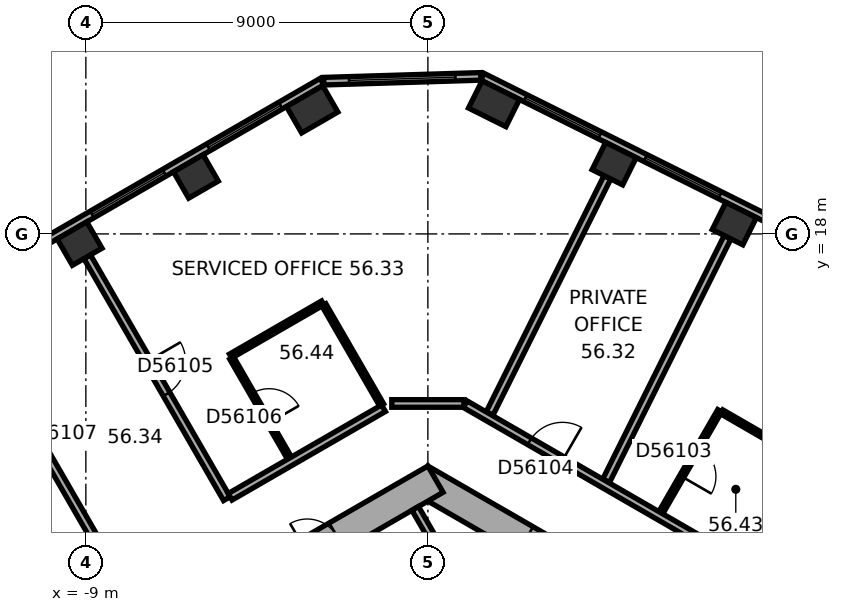
"""IFC4 building model, lengths in metres.
Left out: names, types, materials, properties, quantities, classifications, styles, units other than length and angle.
Written with IfcOpenShell. Run it as: python <this file> out.ifc"""

import sys

from ifc_helpers import new_model, si_unit, direction, frame, frame_2d, origin, origin_2d, place, context, subcontext, project, spatial, rectangle, extrude, element, fill, save


model = new_model("IFC4")
c1 = context("Model", 3, precision=1e-05, world=origin(), true_north=direction((0.0, 1.0)))
c2 = subcontext(c1, "Body", "Model", "MODEL_VIEW")
j1 = project(units=[si_unit("LENGTHUNIT", "METRE"), si_unit("PLANEANGLEUNIT", "RADIAN")], contexts=[c1])
p1 = place(None, origin())
s1 = spatial("IfcSite", under=j1, at=p1, CompositionType="ELEMENT")
p2 = place(p1, origin())
s2 = spatial("IfcBuilding", under=s1, at=p2, CompositionType="ELEMENT")
p3 = place(p2, frame((0.0, 0.0, 229.1)))
s3 = spatial("IfcBuildingStorey", under=s2, at=p3, CompositionType="ELEMENT", Elevation=229.1)
for number, where, z_axis, x_axis in (
    (1, (8.064, 18.271, 0.0), (0.0, 0.0, 1.0), (-0.895, 0.446, 0.0)),
    (2, (4.902, 19.848, 0.0), (0.0, 0.0, 1.0), (-0.895, 0.446, 0.0)),
):
    element("IfcColumn", number, at=place(p3, frame(where, z_axis=z_axis, x_axis=x_axis)), inside=s3, PredefinedType="COLUMN", context=c2, shape_type="SweptSolid", body=[
        extrude(rectangle(XDim=0.9, YDim=0.8, at=origin_2d()), origin(), (0.0, 0.0, 1.0), 3.7),
    ])
for number, where, z_axis, x_axis in (
    (3, (1.74, 21.425, 0.0), (0.0, 0.0, 1.0), (-0.895, 0.446, 0.0)),
    (4, (-3.044, 21.279, 0.0), (0.0, 0.0, 1.0), (-0.866, -0.5, 0.0)),
):
    element("IfcColumn", number, at=place(p3, frame(where, z_axis=z_axis, x_axis=x_axis)), inside=s3, PredefinedType="COLUMN", context=c2, shape_type="SweptSolid", body=[
        extrude(rectangle(XDim=1.1, YDim=0.8, at=origin_2d()), origin(), (0.0, 0.0, 1.0), 3.7),
    ])
for number, where, z_axis, x_axis in (
    (5, (-6.104, 19.512, 0.0), (0.0, 0.0, 1.0), (-0.866, -0.5, 0.0)),
    (6, (-9.165, 17.745, 0.0), (0.0, 0.0, 1.0), (-0.866, -0.5, 0.0)),
):
    element("IfcColumn", number, at=place(p3, frame(where, z_axis=z_axis, x_axis=x_axis)), inside=s3, PredefinedType="COLUMN", context=c2, shape_type="SweptSolid", body=[
        extrude(rectangle(XDim=0.9, YDim=0.8, at=origin_2d()), origin(), (0.0, 0.0, 1.0), 3.7),
    ])
p4 = place(p3, frame((10.1, 5.6, 0.0), z_axis=(0.0, 0.0, 1.0), x_axis=(-0.866023897231, 0.500002609418, 0.0)))
e7 = element("IfcWall", 7, at=p4, inside=s3, PredefinedType="SHEAR", context=c2, shape_type="SweptSolid", body=[
    extrude(rectangle(XDim=11.894, YDim=0.8, at=frame_2d((5.947, 0.0))), origin(), (0.0, 0.0, 1.0), 3.7),
])
p5 = place(p4, frame((3.897, 0.0, 0.0)))
e8 = element("IfcOpeningElement", 8, at=p5, cuts=e7, PredefinedType="OPENING", context=c2, shape_type="SweptSolid", body=[
    extrude(rectangle(XDim=0.9, YDim=2.1, at=frame_2d((0.45, 1.05))), frame((0.0, 0.41, 0.0), z_axis=(0.0, -1.0, 0.0), x_axis=(1.0, 0.0, 0.0)), (0.0, 0.0, 1.0), 0.82),
])
p6 = place(p4, frame((7.797, 0.0, 0.0)))
e9 = element("IfcOpeningElement", 9, at=p6, cuts=e7, PredefinedType="OPENING", context=c2, shape_type="SweptSolid", body=[
    extrude(rectangle(XDim=0.9, YDim=2.1, at=frame_2d((0.45, 1.05))), frame((0.0, 0.41, 0.0), z_axis=(0.0, -1.0, 0.0), x_axis=(1.0, 0.0, 0.0)), (0.0, 0.0, 1.0), 0.82),
])
p7 = place(p3, frame((0.2, 11.547, 0.0), z_axis=(0.0, 0.0, 1.0), x_axis=(-0.866023897231, -0.500002609418, 0.0)))
e10 = element("IfcWall", 10, at=p7, inside=s3, PredefinedType="SHEAR", context=c2, shape_type="SweptSolid", body=[
    extrude(rectangle(XDim=11.894, YDim=0.8, at=frame_2d((5.947, 0.0))), origin(), (0.0, 0.0, 1.0), 3.7),
])
p8 = place(p7, frame((6.147, 0.0, 0.0)))
e11 = element("IfcOpeningElement", 11, at=p8, cuts=e10, PredefinedType="OPENING", context=c2, shape_type="SweptSolid", body=[
    extrude(rectangle(XDim=1.5, YDim=2.1, at=frame_2d((0.75, 1.05))), frame((0.0, 0.41, 0.0), z_axis=(0.0, -1.0, 0.0), x_axis=(1.0, 0.0, 0.0)), (0.0, 0.0, 1.0), 0.82),
])
p9 = place(p7, frame((2.997, 0.0, 0.0)))
e12 = element("IfcOpeningElement", 12, at=p9, cuts=e10, PredefinedType="OPENING", context=c2, shape_type="SweptSolid", body=[
    extrude(rectangle(XDim=0.9, YDim=2.1, at=frame_2d((0.45, 1.05))), frame((0.0, 0.41, 0.0), z_axis=(0.0, -1.0, 0.0), x_axis=(1.0, 0.0, 0.0)), (0.0, 0.0, 1.0), 0.82),
])
p10 = place(p3, frame((18.299, 13.727, 0.0), z_axis=(0.0, 0.0, 1.0), x_axis=(-0.894934554817, 0.44619742558, 0.0)))
e13 = element("IfcWall", 13, at=p10, inside=s3, PredefinedType="STANDARD", context=c2, shape_type="SweptSolid", body=[
    extrude(rectangle(XDim=18.841, YDim=0.2, at=frame_2d((9.421, 0.0))), origin(), (0.0, 0.0, 1.0), 3.7),
])
p11 = place(p10, frame((1.253, 0.0, 0.9)))
e14 = element("IfcOpeningElement", 14, at=p11, cuts=e13, PredefinedType="OPENING", context=c2, shape_type="SweptSolid", body=[
    extrude(rectangle(XDim=2.2, YDim=2.0, at=frame_2d((1.1, 1.0))), frame((0.0, 0.11, 0.0), z_axis=(0.0, -1.0, 0.0), x_axis=(1.0, 0.0, 0.0)), (0.0, 0.0, 1.0), 0.22),
])
p12 = place(p10, frame((4.786, 0.0, 0.9)))
e15 = element("IfcOpeningElement", 15, at=p12, cuts=e13, PredefinedType="OPENING", context=c2, shape_type="SweptSolid", body=[
    extrude(rectangle(XDim=2.2, YDim=2.0, at=frame_2d((1.1, 1.0))), frame((0.0, 0.11, 0.0), z_axis=(0.0, -1.0, 0.0), x_axis=(1.0, 0.0, 0.0)), (0.0, 0.0, 1.0), 0.22),
])
p13 = place(p10, frame((8.32, 0.0, 0.9)))
e16 = element("IfcOpeningElement", 16, at=p13, cuts=e13, PredefinedType="OPENING", context=c2, shape_type="SweptSolid", body=[
    extrude(rectangle(XDim=2.2, YDim=2.0, at=frame_2d((1.1, 1.0))), frame((0.0, 0.11, 0.0), z_axis=(0.0, -1.0, 0.0), x_axis=(1.0, 0.0, 0.0)), (0.0, 0.0, 1.0), 0.22),
])
p14 = place(p10, frame((11.854, 0.0, 0.9)))
e17 = element("IfcOpeningElement", 17, at=p14, cuts=e13, PredefinedType="OPENING", context=c2, shape_type="SweptSolid", body=[
    extrude(rectangle(XDim=2.2, YDim=2.0, at=frame_2d((1.1, 1.0))), frame((0.0, 0.11, 0.0), z_axis=(0.0, -1.0, 0.0), x_axis=(1.0, 0.0, 0.0)), (0.0, 0.0, 1.0), 0.22),
])
p15 = place(p10, frame((15.387, 0.0, 0.9)))
e18 = element("IfcOpeningElement", 18, at=p15, cuts=e13, PredefinedType="OPENING", context=c2, shape_type="SweptSolid", body=[
    extrude(rectangle(XDim=2.2, YDim=2.0, at=frame_2d((1.1, 1.0))), frame((0.0, 0.11, 0.0), z_axis=(0.0, -1.0, 0.0), x_axis=(1.0, 0.0, 0.0)), (0.0, 0.0, 1.0), 0.22),
])
p16 = place(p3, frame((1.389, 22.145, 0.0), z_axis=(0.0, 0.0, 1.0), x_axis=(-0.999534702881, -0.030502093955, 0.0)))
e19 = element("IfcWall", 19, at=p16, inside=s3, PredefinedType="STANDARD", context=c2, shape_type="SweptSolid", body=[
    extrude(rectangle(XDim=4.13, YDim=0.2, at=frame_2d((2.065, 0.0))), origin(), (0.0, 0.0, 1.0), 3.7),
])
p17 = place(p16, frame((0.665, 0.0, 0.9)))
e20 = element("IfcOpeningElement", 20, at=p17, cuts=e19, PredefinedType="OPENING", context=c2, shape_type="SweptSolid", body=[
    extrude(rectangle(XDim=2.8, YDim=2.0, at=frame_2d((1.4, 1.0))), frame((0.0, 0.11, 0.0), z_axis=(0.0, -1.0, 0.0), x_axis=(1.0, 0.0, 0.0)), (0.0, 0.0, 1.0), 0.22),
])
p18 = place(p3, frame((-2.786, 22.005, 0.0), z_axis=(0.0, 0.0, 1.0), x_axis=(-0.866026555358, -0.49999800541, 0.0)))
e21 = element("IfcWall", 21, at=p18, inside=s3, PredefinedType="STANDARD", context=c2, shape_type="SweptSolid", body=[
    extrude(rectangle(XDim=18.841, YDim=0.2, at=frame_2d((9.421, 0.0))), origin(), (0.0, 0.0, 1.0), 3.7),
])
p19 = place(p18, frame((1.254, 0.0, 0.9)))
e22 = element("IfcOpeningElement", 22, at=p19, cuts=e21, PredefinedType="OPENING", context=c2, shape_type="SweptSolid", body=[
    extrude(rectangle(XDim=2.2, YDim=2.0, at=frame_2d((1.1, 1.0))), frame((0.0, 0.11, 0.0), z_axis=(0.0, -1.0, 0.0), x_axis=(1.0, 0.0, 0.0)), (0.0, 0.0, 1.0), 0.22),
])
p20 = place(p18, frame((4.788, 0.0, 0.9)))
e23 = element("IfcOpeningElement", 23, at=p20, cuts=e21, PredefinedType="OPENING", context=c2, shape_type="SweptSolid", body=[
    extrude(rectangle(XDim=2.2, YDim=2.0, at=frame_2d((1.1, 1.0))), frame((0.0, 0.11, 0.0), z_axis=(0.0, -1.0, 0.0), x_axis=(1.0, 0.0, 0.0)), (0.0, 0.0, 1.0), 0.22),
])
p21 = place(p18, frame((8.321, 0.0, 0.9)))
e24 = element("IfcOpeningElement", 24, at=p21, cuts=e21, PredefinedType="OPENING", context=c2, shape_type="SweptSolid", body=[
    extrude(rectangle(XDim=2.2, YDim=2.0, at=frame_2d((1.1, 1.0))), frame((0.0, 0.11, 0.0), z_axis=(0.0, -1.0, 0.0), x_axis=(1.0, 0.0, 0.0)), (0.0, 0.0, 1.0), 0.22),
])
p22 = place(p18, frame((11.855, 0.0, 0.9)))
e25 = element("IfcOpeningElement", 25, at=p22, cuts=e21, PredefinedType="OPENING", context=c2, shape_type="SweptSolid", body=[
    extrude(rectangle(XDim=2.2, YDim=2.0, at=frame_2d((1.1, 1.0))), frame((0.0, 0.11, 0.0), z_axis=(0.0, -1.0, 0.0), x_axis=(1.0, 0.0, 0.0)), (0.0, 0.0, 1.0), 0.22),
])
p23 = place(p18, frame((15.389, 0.0, 0.9)))
e26 = element("IfcOpeningElement", 26, at=p23, cuts=e21, PredefinedType="OPENING", context=c2, shape_type="SweptSolid", body=[
    extrude(rectangle(XDim=2.2, YDim=2.0, at=frame_2d((1.1, 1.0))), frame((0.0, 0.11, 0.0), z_axis=(0.0, -1.0, 0.0), x_axis=(1.0, 0.0, 0.0)), (0.0, 0.0, 1.0), 0.22),
])
p24 = place(p3, frame((0.767, 8.872, 0.0), z_axis=(0.0, 0.0, 1.0), x_axis=(-0.499994660107, 0.866028486751, 0.0)))
e27 = element("IfcWall", 27, at=p24, inside=s3, PredefinedType="PARTITIONING", context=c2, shape_type="SweptSolid", body=[
    extrude(rectangle(XDim=2.2, YDim=0.2, at=frame_2d((1.1, 0.0))), origin(), (0.0, 0.0, 1.0), 3.42),
])
p25 = place(p3, frame((-12.025, 15.632, 0.0), z_axis=(0.0, 0.0, 1.0), x_axis=(0.499983153418, -0.866035129944, 0.0)))
e28 = element("IfcWall", 28, at=p25, inside=s3, PredefinedType="PARTITIONING", context=c2, shape_type="SweptSolid", body=[
    extrude(rectangle(XDim=7.35, YDim=0.2, at=frame_2d((3.675, 0.0))), origin(), (0.0, 0.0, 1.0), 3.42),
])
p26 = place(p25, frame((3.175, 0.0, 0.0)))
e29 = element("IfcOpeningElement", 29, at=p26, cuts=e28, PredefinedType="OPENING", context=c2, shape_type="SweptSolid", body=[
    extrude(rectangle(XDim=1.0, YDim=2.1, at=frame_2d((0.5, 1.05))), frame((0.0, 0.11, 0.0), z_axis=(0.0, -1.0, 0.0), x_axis=(1.0, 0.0, 0.0)), (0.0, 0.0, 1.0), 0.22),
])
p27 = place(p3, frame((-8.965, 17.399, 0.0), z_axis=(0.0, 0.0, 1.0), x_axis=(0.499993683172, -0.866029050776, 0.0)))
e30 = element("IfcWall", 30, at=p27, inside=s3, PredefinedType="PARTITIONING", context=c2, shape_type="SweptSolid", body=[
    extrude(rectangle(XDim=7.35, YDim=0.2, at=frame_2d((3.675, 0.0))), origin(), (0.0, 0.0, 1.0), 2.87),
])
p28 = place(p27, frame((3.175, 0.0, 0.0)))
e31 = element("IfcOpeningElement", 31, at=p28, cuts=e30, PredefinedType="OPENING", context=c2, shape_type="SweptSolid", body=[
    extrude(rectangle(XDim=1.0, YDim=2.1, at=frame_2d((0.5, 1.05))), frame((0.0, 0.11, 0.0), z_axis=(0.0, -1.0, 0.0), x_axis=(1.0, 0.0, 0.0)), (0.0, 0.0, 1.0), 0.22),
])
p29 = place(p3, frame((-5.191, 14.785, 0.0), z_axis=(0.0, 0.0, 1.0), x_axis=(0.866034573852, 0.49998411664, 0.0)))
e32 = element("IfcWall", 32, at=p29, inside=s3, PredefinedType="PARTITIONING", context=c2, shape_type="SweptSolid", body=[
    extrude(rectangle(XDim=2.8, YDim=0.12, at=frame_2d((1.4, 0.0))), origin(), (0.0, 0.0, 1.0), 3.42),
])
p30 = place(p3, frame((-3.641, 12.101, 0.0), z_axis=(0.0, 0.0, 1.0), x_axis=(-0.500026023896, 0.86601037836, 0.0)))
e33 = element("IfcWall", 33, at=p30, inside=s3, PredefinedType="PARTITIONING", context=c2, shape_type="SweptSolid", body=[
    extrude(rectangle(XDim=3.04, YDim=0.12, at=frame_2d((1.52, 0.0))), origin(), (0.0, 0.0, 1.0), 3.42),
])
p31 = place(p30, frame((1.07, 0.0, 0.0)))
e34 = element("IfcOpeningElement", 34, at=p31, cuts=e33, PredefinedType="OPENING", context=c2, shape_type="SweptSolid", body=[
    extrude(rectangle(XDim=0.9, YDim=2.1, at=frame_2d((0.45, 1.05))), frame((0.0, 0.07, 0.0), z_axis=(0.0, -1.0, 0.0), x_axis=(1.0, 0.0, 0.0)), (0.0, 0.0, 1.0), 0.14),
])
p32 = place(p3, frame((-2.737, 16.133, 0.0), z_axis=(0.0, 0.0, 1.0), x_axis=(0.500026023896, -0.86601037836, 0.0)))
e35 = element("IfcWall", 35, at=p32, inside=s3, PredefinedType="PARTITIONING", context=c2, shape_type="SweptSolid", body=[
    extrude(rectangle(XDim=3.04, YDim=0.12, at=frame_2d((1.52, 0.0))), origin(), (0.0, 0.0, 1.0), 3.42),
])
p33 = place(p3, frame((-1.167, 13.414, 0.0), z_axis=(0.0, 0.0, 1.0), x_axis=(-0.866023347809, -0.500003561037, 0.0)))
e36 = element("IfcWall", 36, at=p33, inside=s3, PredefinedType="PARTITIONING", context=c2, shape_type="SweptSolid", body=[
    extrude(rectangle(XDim=4.661, YDim=0.2, at=frame_2d((2.331, 0.0))), origin(), (0.0, 0.0, 1.0), 3.42),
])
p34 = place(p3, frame((0.95, 13.539, 0.0), z_axis=(0.0, 0.0, 1.0), x_axis=(-1.0, 0.0, 0.0)))
e37 = element("IfcWall", 37, at=p34, inside=s3, PredefinedType="PARTITIONING", context=c2, shape_type="SweptSolid", body=[
    extrude(rectangle(XDim=1.9, YDim=0.2, at=frame_2d((0.95, 0.0))), origin(), (0.0, 0.0, 1.0), 3.42),
])
p35 = place(p3, frame((4.723, 19.49, 0.0), z_axis=(0.0, 0.0, 1.0), x_axis=(-0.446186614574, -0.894939944898, 0.0)))
e38 = element("IfcWall", 38, at=p35, inside=s3, PredefinedType="PARTITIONING", context=c2, shape_type="SweptSolid", body=[
    extrude(rectangle(XDim=6.944, YDim=0.2, at=frame_2d((3.472, 0.0))), origin(), (0.0, 0.0, 1.0), 2.87),
])
p36 = place(p3, frame((6.13, 10.664, 0.0), z_axis=(0.0, 0.0, 1.0), x_axis=(0.499967891604, 0.866043940782, 0.0)))
e39 = element("IfcWall", 39, at=p36, inside=s3, PredefinedType="PARTITIONING", context=c2, shape_type="SweptSolid", body=[
    extrude(rectangle(XDim=3.1, YDim=0.12, at=frame_2d((1.55, 0.0))), origin(), (0.0, 0.0, 1.0), 3.42),
])
p37 = place(p36, frame((1.1, 0.0, 0.0)))
e40 = element("IfcOpeningElement", 40, at=p37, cuts=e39, PredefinedType="OPENING", context=c2, shape_type="SweptSolid", body=[
    extrude(rectangle(XDim=0.9, YDim=2.1, at=frame_2d((0.45, 1.05))), frame((0.0, 0.07, 0.0), z_axis=(0.0, -1.0, 0.0), x_axis=(1.0, 0.0, 0.0)), (0.0, 0.0, 1.0), 0.14),
])
p38 = place(p3, frame((7.732, 13.318, 0.0), z_axis=(0.0, 0.0, 1.0), x_axis=(0.866057988685, -0.499943557049, 0.0)))
e41 = element("IfcWall", 41, at=p38, inside=s3, PredefinedType="PARTITIONING", context=c2, shape_type="SweptSolid", body=[
    extrude(rectangle(XDim=2.74, YDim=0.12, at=frame_2d((1.37, 0.0))), origin(), (0.0, 0.0, 1.0), 3.42),
])
p39 = place(p3, frame((7.886, 17.913, 0.0), z_axis=(0.0, 0.0, 1.0), x_axis=(-0.446204015428, -0.894931269213, 0.0)))
e42 = element("IfcWall", 42, at=p39, inside=s3, PredefinedType="PARTITIONING", context=c2, shape_type="SweptSolid", body=[
    extrude(rectangle(XDim=7.16, YDim=0.2, at=frame_2d((3.58, 0.0))), origin(), (0.0, 0.0, 1.0), 3.42),
])
p40 = place(p3, frame((8.505, 9.177, 0.0), z_axis=(0.0, 0.0, 1.0), x_axis=(-0.866019839902, 0.500009636803, 0.0)))
e43 = element("IfcWall", 43, at=p40, inside=s3, PredefinedType="PARTITIONING", context=c2, shape_type="SweptSolid", body=[
    extrude(rectangle(XDim=8.683, YDim=0.2, at=frame_2d((4.342, 0.0))), origin(), (0.0, 0.0, 1.0), 3.42),
])
p41 = place(p40, frame((5.73, 0.0, 0.0)))
e44 = element("IfcOpeningElement", 44, at=p41, cuts=e43, PredefinedType="OPENING", context=c2, shape_type="SweptSolid", body=[
    extrude(rectangle(XDim=1.0, YDim=2.1, at=frame_2d((0.5, 1.05))), frame((0.0, 0.11, 0.0), z_axis=(0.0, -1.0, 0.0), x_axis=(1.0, 0.0, 0.0)), (0.0, 0.0, 1.0), 0.22),
])
p42 = place(p3, frame((8.659, 9.204, 0.0), z_axis=(0.0, 0.0, 1.0), x_axis=(0.499933790963, 0.866063626216, 0.0)))
e45 = element("IfcWall", 45, at=p42, inside=s3, PredefinedType="PARTITIONING", context=c2, shape_type="SweptSolid", body=[
    extrude(rectangle(XDim=3.1, YDim=0.12, at=frame_2d((1.55, 0.0))), origin(), (0.0, 0.0, 1.0), 3.42),
])
p43 = place(p3, frame((10.075, 11.896, 0.0), z_axis=(0.0, 0.0, 1.0), x_axis=(-0.499991248344, -0.866030456496, 0.0)))
e46 = element("IfcWall", 46, at=p43, inside=s3, PredefinedType="PARTITIONING", context=c2, shape_type="SweptSolid", body=[
    extrude(rectangle(XDim=3.04, YDim=0.12, at=frame_2d((1.52, 0.0))), origin(), (0.0, 0.0, 1.0), 3.42),
])
p44 = place(p14, origin())
e47 = element("IfcWindow", 47, at=p44, inside=s3, PartitioningType="SINGLE_PANEL", PredefinedType="WINDOW", context=c2, shape_type="SweptSolid", body=[
    extrude(rectangle(XDim=2.2, YDim=2.0, at=frame_2d((1.1, 1.0))), frame((0.0, 0.03, 0.0), z_axis=(0.0, -1.0, 0.0), x_axis=(1.0, 0.0, 0.0)), (0.0, 0.0, 1.0), 0.06),
])
fill(e17, e47)
p45 = place(p15, origin())
e48 = element("IfcWindow", 48, at=p45, inside=s3, PartitioningType="SINGLE_PANEL", PredefinedType="WINDOW", context=c2, shape_type="SweptSolid", body=[
    extrude(rectangle(XDim=2.2, YDim=2.0, at=frame_2d((1.1, 1.0))), frame((0.0, 0.03, 0.0), z_axis=(0.0, -1.0, 0.0), x_axis=(1.0, 0.0, 0.0)), (0.0, 0.0, 1.0), 0.06),
])
fill(e18, e48)
p46 = place(p17, origin())
e49 = element("IfcWindow", 49, at=p46, inside=s3, PartitioningType="SINGLE_PANEL", PredefinedType="WINDOW", context=c2, shape_type="SweptSolid", body=[
    extrude(rectangle(XDim=2.8, YDim=2.0, at=frame_2d((1.4, 1.0))), frame((0.0, 0.03, 0.0), z_axis=(0.0, -1.0, 0.0), x_axis=(1.0, 0.0, 0.0)), (0.0, 0.0, 1.0), 0.06),
])
fill(e20, e49)
p47 = place(p19, origin())
e50 = element("IfcWindow", 50, at=p47, inside=s3, PartitioningType="SINGLE_PANEL", PredefinedType="WINDOW", context=c2, shape_type="SweptSolid", body=[
    extrude(rectangle(XDim=2.2, YDim=2.0, at=frame_2d((1.1, 1.0))), frame((0.0, 0.03, 0.0), z_axis=(0.0, -1.0, 0.0), x_axis=(1.0, 0.0, 0.0)), (0.0, 0.0, 1.0), 0.06),
])
fill(e22, e50)
p48 = place(p20, origin())
e51 = element("IfcWindow", 51, at=p48, inside=s3, PartitioningType="SINGLE_PANEL", PredefinedType="WINDOW", context=c2, shape_type="SweptSolid", body=[
    extrude(rectangle(XDim=2.2, YDim=2.0, at=frame_2d((1.1, 1.0))), frame((0.0, 0.03, 0.0), z_axis=(0.0, -1.0, 0.0), x_axis=(1.0, 0.0, 0.0)), (0.0, 0.0, 1.0), 0.06),
])
fill(e23, e51)
p49 = place(p37, origin())
e52 = element("IfcDoor", 52, at=p49, inside=s3, OperationType="SINGLE_SWING_LEFT", PredefinedType="DOOR", context=c2, shape_type="SweptSolid", body=[
    extrude(rectangle(XDim=0.9, YDim=2.1, at=frame_2d((0.45, 1.05))), frame((0.0, 0.025, 0.0), z_axis=(0.0, -1.0, 0.0), x_axis=(1.0, 0.0, 0.0)), (0.0, 0.0, 1.0), 0.05),
])
fill(e40, e52)
p50 = place(p41, origin())
e53 = element("IfcDoor", 53, at=p50, inside=s3, OperationType="SINGLE_SWING_LEFT", PredefinedType="DOOR", context=c2, shape_type="SweptSolid", body=[
    extrude(rectangle(XDim=1.0, YDim=2.1, at=frame_2d((0.5, 1.05))), frame((0.0, 0.025, 0.0), z_axis=(0.0, -1.0, 0.0), x_axis=(1.0, 0.0, 0.0)), (0.0, 0.0, 1.0), 0.05),
])
fill(e44, e53)
p51 = place(p28, origin())
e54 = element("IfcDoor", 54, at=p51, inside=s3, OperationType="SINGLE_SWING_LEFT", PredefinedType="DOOR", context=c2, shape_type="SweptSolid", body=[
    extrude(rectangle(XDim=1.0, YDim=2.1, at=frame_2d((0.5, 1.05))), frame((0.0, 0.025, 0.0), z_axis=(0.0, -1.0, 0.0), x_axis=(1.0, 0.0, 0.0)), (0.0, 0.0, 1.0), 0.05),
])
fill(e31, e54)
p52 = place(p31, origin())
e55 = element("IfcDoor", 55, at=p52, inside=s3, OperationType="SINGLE_SWING_LEFT", PredefinedType="DOOR", context=c2, shape_type="SweptSolid", body=[
    extrude(rectangle(XDim=0.9, YDim=2.1, at=frame_2d((0.45, 1.05))), frame((0.0, 0.025, 0.0), z_axis=(0.0, -1.0, 0.0), x_axis=(1.0, 0.0, 0.0)), (0.0, 0.0, 1.0), 0.05),
])
fill(e34, e55)
save(model, sys.argv[1])
